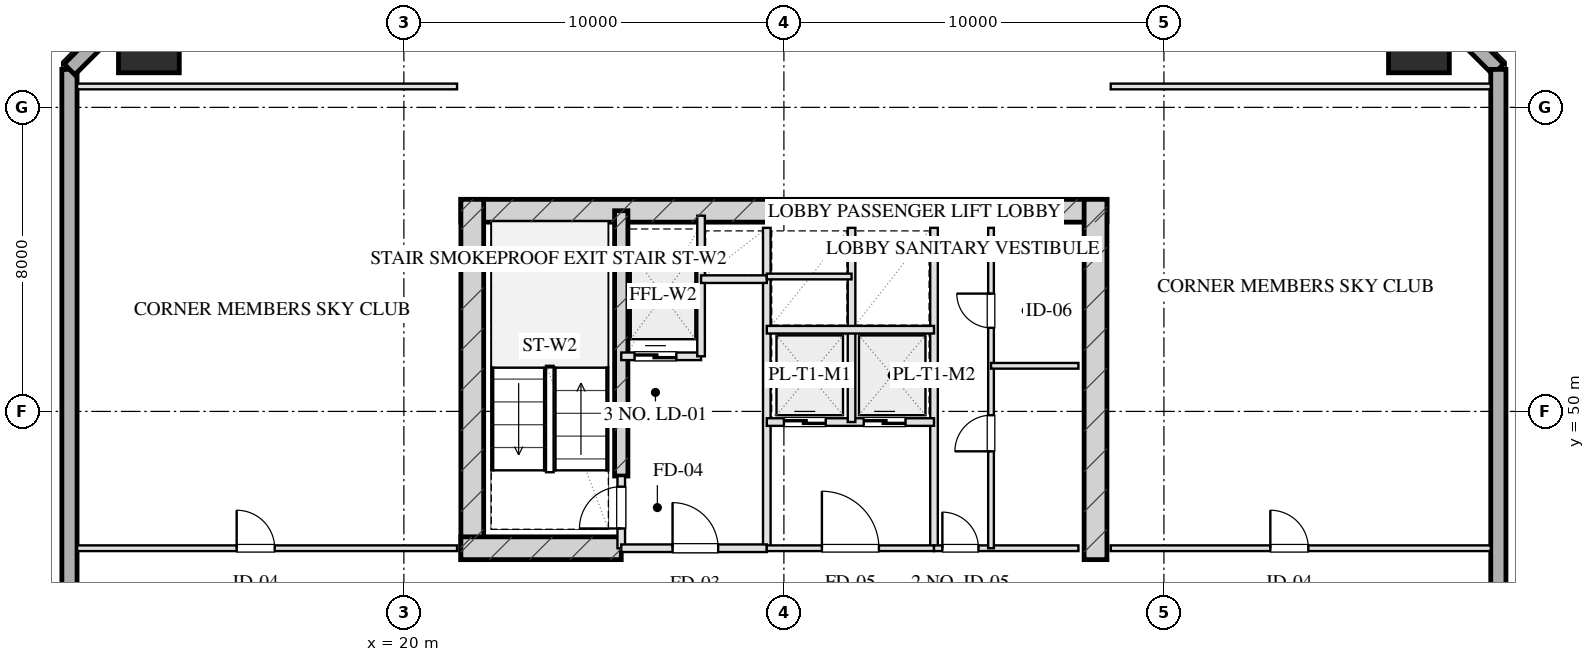
"""IFC4 building model, lengths in metres.
Left out: names, types, materials, properties, quantities, classifications, styles, units other than length and angle.
Written with IfcOpenShell. Run it as: python <this file> out.ifc"""

import sys

from ifc_helpers import new_model, si_unit, direction, frame, frame_2d, origin, origin_2d, place, context, subcontext, project, spatial, rectangle, hollow_rectangle, extrude, element, fill, save


model = new_model("IFC4")
c1 = context("Model", 3, precision=1e-05, world=origin(), true_north=direction((0.0, 1.0)))
c2 = subcontext(c1, "Body", "Model", "MODEL_VIEW")
j1 = project(units=[si_unit("LENGTHUNIT", "METRE"), si_unit("PLANEANGLEUNIT", "RADIAN")], contexts=[c1])
p1 = place(None, origin())
s1 = spatial("IfcSite", under=j1, at=p1, CompositionType="ELEMENT")
p2 = place(p1, origin())
s2 = spatial("IfcBuilding", under=s1, at=p2, CompositionType="ELEMENT")
p3 = place(p2, frame((0.0, 0.0, 156.4)))
s3 = spatial("IfcBuildingStorey", under=s2, at=p3, CompositionType="ELEMENT", Elevation=156.4)
p4 = place(p3, frame((21.5, 55.28, 0.0), z_axis=(0.0, 0.0, 1.0), x_axis=(1.0, 0.0, 0.0)))
e1 = element("IfcWall", 1, at=p4, inside=s3, PredefinedType="SHEAR", context=c2, shape_type="SweptSolid", body=[
    extrude(rectangle(XDim=17.0, YDim=0.6, at=frame_2d((8.5, 0.0))), origin(), (0.0, 0.0, 1.0), 3.45),
])
for number, where, z_axis, x_axis in (
    (2, (21.8, 46.1, 0.0), (0.0, 0.0, 1.0), (0.0, 1.0, 0.0)),
    (3, (38.2, 46.1, 0.0), (0.0, 0.0, 1.0), (0.0, 1.0, 0.0)),
):
    element("IfcWall", number, at=place(p3, frame(where, z_axis=z_axis, x_axis=x_axis)), inside=s3, PredefinedType="SHEAR", context=c2, shape_type="SweptSolid", body=[
        extrude(rectangle(XDim=9.48, YDim=0.6, at=frame_2d((4.74, 0.0))), origin(), (0.0, 0.0, 1.0), 3.45),
    ])
p5 = place(p3, frame((25.72, 48.3, 0.0), z_axis=(0.0, 0.0, 1.0), x_axis=(0.0, 1.0, 0.0)))
e4 = element("IfcWall", 4, at=p5, inside=s3, PredefinedType="SHEAR", context=c2, shape_type="SweptSolid", body=[
    extrude(rectangle(XDim=6.98, YDim=0.35, at=frame_2d((3.49, 0.0))), origin(), (0.0, 0.0, 1.0), 3.45),
])
p6 = place(p3, frame((21.5, 46.4, 0.0), z_axis=(0.0, 0.0, 1.0), x_axis=(1.0, 0.0, 0.0)))
e5 = element("IfcWall", 5, at=p6, inside=s3, PredefinedType="SHEAR", context=c2, shape_type="SweptSolid", body=[
    extrude(rectangle(XDim=4.22, YDim=0.6, at=frame_2d((2.11, 0.0))), origin(), (0.0, 0.0, 1.0), 3.45),
])
for number, where, z_axis, x_axis in (
    (6, (46.71, 59.71, 0.0), (0.0, 0.0, 1.0), (1.0, 0.0, 0.0)),
    (7, (13.29, 59.71, 0.0), (0.0, 0.0, 1.0), (1.0, 0.0, 0.0)),
):
    element("IfcColumn", number, at=place(p3, frame(where, z_axis=z_axis, x_axis=x_axis)), inside=s3, PredefinedType="COLUMN", context=c2, shape_type="SweptSolid", body=[
        extrude(hollow_rectangle(XDim=1.6, YDim=1.6, WallThickness=0.055, at=origin_2d()), origin(), (0.0, 0.0, 1.0), 3.451),
    ])
p7 = place(p3, frame((11.2, 9.0, 0.0), z_axis=(0.0, 0.0, 1.0), x_axis=(0.0, 1.0, 0.0)))
e8 = element("IfcWall", 8, at=p7, inside=s3, PredefinedType="SOLIDWALL", context=c2, shape_type="SweptSolid", body=[
    extrude(rectangle(XDim=50.0, YDim=0.4, at=frame_2d((25.0, 0.0))), origin(), (0.0, 0.0, 1.0), 2.61),
])
p8 = place(p7, frame((17.475, 0.0, 0.75)))
e9 = element("IfcOpeningElement", 9, at=p8, cuts=e8, PredefinedType="OPENING", context=c2, shape_type="SweptSolid", body=[
    extrude(rectangle(XDim=2.25, YDim=1.46, at=frame_2d((1.125, 0.73))), frame((0.0, 0.21, 0.0), z_axis=(0.0, -1.0, 0.0), x_axis=(1.0, 0.0, 0.0)), (0.0, 0.0, 1.0), 0.42),
])
p9 = place(p7, frame((30.25, 0.0, 0.0)))
e10 = element("IfcOpeningElement", 10, at=p9, cuts=e8, PredefinedType="OPENING", context=c2, shape_type="SweptSolid", body=[
    extrude(rectangle(XDim=1.1, YDim=2.15, at=frame_2d((0.55, 1.075))), frame((0.0, 0.21, 0.0), z_axis=(0.0, -1.0, 0.0), x_axis=(1.0, 0.0, 0.0)), (0.0, 0.0, 1.0), 0.42),
])
for number, where, z_axis, x_axis in (
    (11, (11.2, 59.0, 0.0), (0.0, 0.0, 1.0), (0.707, 0.707, 0.0)),
    (12, (46.0, 61.8, 0.0), (0.0, 0.0, 1.0), (0.707, -0.707, 0.0)),
):
    element("IfcWall", number, at=place(p3, frame(where, z_axis=z_axis, x_axis=x_axis)), inside=s3, PredefinedType="SOLIDWALL", context=c2, shape_type="SweptSolid", body=[
        extrude(rectangle(XDim=3.96, YDim=0.4, at=frame_2d((1.98, 0.0))), origin(), (0.0, 0.0, 1.0), 2.61),
    ])
p10 = place(p3, frame((48.8, 59.0, 0.0), z_axis=(0.0, 0.0, 1.0), x_axis=(0.0, -1.0, 0.0)))
e13 = element("IfcWall", 13, at=p10, inside=s3, PredefinedType="SOLIDWALL", context=c2, shape_type="SweptSolid", body=[
    extrude(rectangle(XDim=50.0, YDim=0.4, at=frame_2d((25.0, 0.0))), origin(), (0.0, 0.0, 1.0), 2.61),
])
p11 = place(p10, frame((21.35, 0.0, 0.0)))
e14 = element("IfcOpeningElement", 14, at=p11, cuts=e13, PredefinedType="OPENING", context=c2, shape_type="SweptSolid", body=[
    extrude(rectangle(XDim=1.1, YDim=2.15, at=frame_2d((0.55, 1.075))), frame((0.0, 0.21, 0.0), z_axis=(0.0, -1.0, 0.0), x_axis=(1.0, 0.0, 0.0)), (0.0, 0.0, 1.0), 0.42),
])
p12 = place(p3, frame((25.72, 46.4, 0.0), z_axis=(0.0, 0.0, 1.0), x_axis=(0.0, 1.0, 0.0)))
e15 = element("IfcWall", 15, at=p12, inside=s3, PredefinedType="PARTITIONING", context=c2, shape_type="SweptSolid", body=[
    extrude(rectangle(XDim=1.9, YDim=0.2, at=frame_2d((0.95, 0.0))), origin(), (0.0, 0.0, 1.0), 3.175),
])
p13 = place(p12, frame((0.52, 0.0, 0.0)))
e16 = element("IfcOpeningElement", 16, at=p13, cuts=e15, PredefinedType="OPENING", context=c2, shape_type="SweptSolid", body=[
    extrude(rectangle(XDim=1.1, YDim=2.05, at=frame_2d((0.55, 1.025))), frame((0.0, 0.11, 0.0), z_axis=(0.0, -1.0, 0.0), x_axis=(1.0, 0.0, 0.0)), (0.0, 0.0, 1.0), 0.22),
])
p14 = place(p3, frame((29.55, 46.4, 0.0), z_axis=(0.0, 0.0, 1.0), x_axis=(0.0, 1.0, 0.0)))
e17 = element("IfcWall", 17, at=p14, inside=s3, PredefinedType="PARTITIONING", context=c2, shape_type="SweptSolid", body=[
    extrude(rectangle(XDim=8.43, YDim=0.2, at=frame_2d((4.215, 0.0))), origin(), (0.0, 0.0, 1.0), 3.175),
])
p15 = place(p3, frame((25.72, 46.4, 0.0), z_axis=(0.0, 0.0, 1.0), x_axis=(1.0, 0.0, 0.0)))
e18 = element("IfcWall", 18, at=p15, inside=s3, PredefinedType="PARTITIONING", context=c2, shape_type="SweptSolid", body=[
    extrude(rectangle(XDim=3.83, YDim=0.2, at=frame_2d((1.915, 0.0))), origin(), (0.0, 0.0, 1.0), 3.175),
])
p16 = place(p15, frame((1.35, 0.0, 0.0)))
e19 = element("IfcOpeningElement", 19, at=p16, cuts=e18, PredefinedType="OPENING", context=c2, shape_type="SweptSolid", body=[
    extrude(rectangle(XDim=1.2, YDim=2.05, at=frame_2d((0.6, 1.025))), frame((0.0, 0.11, 0.0), z_axis=(0.0, -1.0, 0.0), x_axis=(1.0, 0.0, 0.0)), (0.0, 0.0, 1.0), 0.22),
])
p17 = place(p3, frame((25.72, 51.45, 0.0), z_axis=(0.0, 0.0, 1.0), x_axis=(1.0, 0.0, 0.0)))
e20 = element("IfcWall", 20, at=p17, inside=s3, PredefinedType="PARTITIONING", context=c2, shape_type="SweptSolid", body=[
    extrude(rectangle(XDim=2.1, YDim=0.2, at=frame_2d((1.05, 0.0))), origin(), (0.0, 0.0, 1.0), 3.175),
])
p18 = place(p17, frame((0.35, 0.0, 0.0)))
e21 = element("IfcOpeningElement", 21, at=p18, cuts=e20, PredefinedType="OPENING", context=c2, shape_type="SweptSolid", body=[
    extrude(rectangle(XDim=1.1, YDim=2.05, at=frame_2d((0.55, 1.025))), frame((0.0, 0.11, 0.0), z_axis=(0.0, -1.0, 0.0), x_axis=(1.0, 0.0, 0.0)), (0.0, 0.0, 1.0), 0.22),
])
p19 = place(p3, frame((27.82, 51.45, 0.0), z_axis=(0.0, 0.0, 1.0), x_axis=(0.0, 1.0, 0.0)))
e22 = element("IfcWall", 22, at=p19, inside=s3, PredefinedType="PARTITIONING", context=c2, shape_type="SweptSolid", body=[
    extrude(rectangle(XDim=3.7, YDim=0.2, at=frame_2d((1.85, 0.0))), origin(), (0.0, 0.0, 1.0), 3.175),
])
p20 = place(p3, frame((27.82, 53.48, 0.0), z_axis=(0.0, 0.0, 1.0), x_axis=(1.0, 0.0, 0.0)))
e23 = element("IfcWall", 23, at=p20, inside=s3, PredefinedType="PARTITIONING", context=c2, shape_type="SweptSolid", body=[
    extrude(rectangle(XDim=1.73, YDim=0.2, at=frame_2d((0.865, 0.0))), origin(), (0.0, 0.0, 1.0), 3.175),
])
p21 = place(p3, frame((33.95, 46.4, 0.0), z_axis=(0.0, 0.0, 1.0), x_axis=(0.0, 1.0, 0.0)))
e24 = element("IfcWall", 24, at=p21, inside=s3, PredefinedType="PARTITIONING", context=c2, shape_type="SweptSolid", body=[
    extrude(rectangle(XDim=8.43, YDim=0.2, at=frame_2d((4.215, 0.0))), origin(), (0.0, 0.0, 1.0), 3.175),
])
p22 = place(p3, frame((29.55, 46.4, 0.0), z_axis=(0.0, 0.0, 1.0), x_axis=(1.0, 0.0, 0.0)))
e25 = element("IfcWall", 25, at=p22, inside=s3, PredefinedType="PARTITIONING", context=c2, shape_type="SweptSolid", body=[
    extrude(rectangle(XDim=4.4, YDim=0.15, at=frame_2d((2.2, 0.0))), origin(), (0.0, 0.0, 1.0), 3.175),
])
p23 = place(p22, frame((1.45, 0.0, 0.0)))
e26 = element("IfcOpeningElement", 26, at=p23, cuts=e25, PredefinedType="OPENING", context=c2, shape_type="SweptSolid", body=[
    extrude(rectangle(XDim=1.5, YDim=2.05, at=frame_2d((0.75, 1.025))), frame((0.0, 0.085, 0.0), z_axis=(0.0, -1.0, 0.0), x_axis=(1.0, 0.0, 0.0)), (0.0, 0.0, 1.0), 0.17),
])
p24 = place(p3, frame((29.55, 49.72, 0.0), z_axis=(0.0, 0.0, 1.0), x_axis=(1.0, 0.0, 0.0)))
e27 = element("IfcWall", 27, at=p24, inside=s3, PredefinedType="PARTITIONING", context=c2, shape_type="SweptSolid", body=[
    extrude(rectangle(XDim=4.4, YDim=0.2, at=frame_2d((2.2, 0.0))), origin(), (0.0, 0.0, 1.0), 3.175),
])
p25 = place(p24, frame((0.45, 0.0, 0.0)))
e28 = element("IfcOpeningElement", 28, at=p25, cuts=e27, PredefinedType="OPENING", context=c2, shape_type="SweptSolid", body=[
    extrude(rectangle(XDim=1.1, YDim=2.05, at=frame_2d((0.55, 1.025))), frame((0.0, 0.11, 0.0), z_axis=(0.0, -1.0, 0.0), x_axis=(1.0, 0.0, 0.0)), (0.0, 0.0, 1.0), 0.22),
])
p26 = place(p24, frame((2.55, 0.0, 0.0)))
e29 = element("IfcOpeningElement", 29, at=p26, cuts=e27, PredefinedType="OPENING", context=c2, shape_type="SweptSolid", body=[
    extrude(rectangle(XDim=1.1, YDim=2.05, at=frame_2d((0.55, 1.025))), frame((0.0, 0.11, 0.0), z_axis=(0.0, -1.0, 0.0), x_axis=(1.0, 0.0, 0.0)), (0.0, 0.0, 1.0), 0.22),
])
p27 = place(p3, frame((31.78, 49.72, 0.0), z_axis=(0.0, 0.0, 1.0), x_axis=(0.0, 1.0, 0.0)))
e30 = element("IfcWall", 30, at=p27, inside=s3, PredefinedType="PARTITIONING", context=c2, shape_type="SweptSolid", body=[
    extrude(rectangle(XDim=5.11, YDim=0.2, at=frame_2d((2.555, 0.0))), origin(), (0.0, 0.0, 1.0), 3.175),
])
p28 = place(p3, frame((29.55, 52.15, 0.0), z_axis=(0.0, 0.0, 1.0), x_axis=(1.0, 0.0, 0.0)))
e31 = element("IfcWall", 31, at=p28, inside=s3, PredefinedType="PARTITIONING", context=c2, shape_type="SweptSolid", body=[
    extrude(rectangle(XDim=4.4, YDim=0.2, at=frame_2d((2.2, 0.0))), origin(), (0.0, 0.0, 1.0), 3.175),
])
p29 = place(p3, frame((29.55, 53.55, 0.0), z_axis=(0.0, 0.0, 1.0), x_axis=(1.0, 0.0, 0.0)))
e32 = element("IfcWall", 32, at=p29, inside=s3, PredefinedType="PARTITIONING", context=c2, shape_type="SweptSolid", body=[
    extrude(rectangle(XDim=2.23, YDim=0.15, at=frame_2d((1.115, 0.0))), origin(), (0.0, 0.0, 1.0), 3.175),
])
p30 = place(p3, frame((33.95, 46.4, 0.0), z_axis=(0.0, 0.0, 1.0), x_axis=(1.0, 0.0, 0.0)))
e33 = element("IfcWall", 33, at=p30, inside=s3, PredefinedType="PARTITIONING", context=c2, shape_type="SweptSolid", body=[
    extrude(rectangle(XDim=3.8, YDim=0.15, at=frame_2d((1.9, 0.0))), origin(), (0.0, 0.0, 1.0), 3.175),
])
p31 = place(p30, frame((0.22, 0.0, 0.0)))
e34 = element("IfcOpeningElement", 34, at=p31, cuts=e33, PredefinedType="OPENING", context=c2, shape_type="SweptSolid", body=[
    extrude(rectangle(XDim=0.95, YDim=2.05, at=frame_2d((0.475, 1.025))), frame((0.0, 0.085, 0.0), z_axis=(0.0, -1.0, 0.0), x_axis=(1.0, 0.0, 0.0)), (0.0, 0.0, 1.0), 0.17),
])
p32 = place(p3, frame((35.45, 46.4, 0.0), z_axis=(0.0, 0.0, 1.0), x_axis=(0.0, 1.0, 0.0)))
e35 = element("IfcWall", 35, at=p32, inside=s3, PredefinedType="PARTITIONING", context=c2, shape_type="SweptSolid", body=[
    extrude(rectangle(XDim=8.43, YDim=0.15, at=frame_2d((4.215, 0.0))), origin(), (0.0, 0.0, 1.0), 2.815),
])
p33 = place(p32, frame((2.55, 0.0, 0.0)))
e36 = element("IfcOpeningElement", 36, at=p33, cuts=e35, PredefinedType="OPENING", context=c2, shape_type="SweptSolid", body=[
    extrude(rectangle(XDim=0.95, YDim=2.05, at=frame_2d((0.475, 1.025))), frame((0.0, 0.085, 0.0), z_axis=(0.0, -1.0, 0.0), x_axis=(1.0, 0.0, 0.0)), (0.0, 0.0, 1.0), 0.17),
])
p34 = place(p32, frame((5.8, 0.0, 0.0)))
e37 = element("IfcOpeningElement", 37, at=p34, cuts=e35, PredefinedType="OPENING", context=c2, shape_type="SweptSolid", body=[
    extrude(rectangle(XDim=0.9, YDim=2.05, at=frame_2d((0.45, 1.025))), frame((0.0, 0.085, 0.0), z_axis=(0.0, -1.0, 0.0), x_axis=(1.0, 0.0, 0.0)), (0.0, 0.0, 1.0), 0.17),
])
p35 = place(p3, frame((35.45, 51.2, 0.0), z_axis=(0.0, 0.0, 1.0), x_axis=(1.0, 0.0, 0.0)))
e38 = element("IfcWall", 38, at=p35, inside=s3, PredefinedType="PARTITIONING", context=c2, shape_type="SweptSolid", body=[
    extrude(rectangle(XDim=2.3, YDim=0.15, at=frame_2d((1.15, 0.0))), origin(), (0.0, 0.0, 1.0), 3.175),
])
p36 = place(p3, frame((11.4, 58.55, 0.0), z_axis=(0.0, 0.0, 1.0), x_axis=(1.0, 0.0, 0.0)))
e39 = element("IfcWall", 39, at=p36, inside=s3, PredefinedType="PARTITIONING", context=c2, shape_type="SweptSolid", body=[
    extrude(rectangle(XDim=10.0, YDim=0.15, at=frame_2d((5.0, 0.0))), origin(), (0.0, 0.0, 1.0), 3.175),
])
p37 = place(p3, frame((11.4, 46.4, 0.0), z_axis=(0.0, 0.0, 1.0), x_axis=(1.0, 0.0, 0.0)))
e40 = element("IfcWall", 40, at=p37, inside=s3, PredefinedType="PARTITIONING", context=c2, shape_type="SweptSolid", body=[
    extrude(rectangle(XDim=10.0, YDim=0.15, at=frame_2d((5.0, 0.0))), origin(), (0.0, 0.0, 1.0), 2.15),
])
p38 = place(p37, frame((4.2, 0.0, 0.0)))
e41 = element("IfcOpeningElement", 41, at=p38, cuts=e40, PredefinedType="OPENING", context=c2, shape_type="SweptSolid", body=[
    extrude(rectangle(XDim=1.0, YDim=2.05, at=frame_2d((0.5, 1.025))), frame((0.0, 0.085, 0.0), z_axis=(0.0, -1.0, 0.0), x_axis=(1.0, 0.0, 0.0)), (0.0, 0.0, 1.0), 0.17),
])
p39 = place(p3, frame((38.6, 58.55, 0.0), z_axis=(0.0, 0.0, 1.0), x_axis=(1.0, 0.0, 0.0)))
e42 = element("IfcWall", 42, at=p39, inside=s3, PredefinedType="PARTITIONING", context=c2, shape_type="SweptSolid", body=[
    extrude(rectangle(XDim=10.0, YDim=0.15, at=frame_2d((5.0, 0.0))), origin(), (0.0, 0.0, 1.0), 3.175),
])
p40 = place(p3, frame((38.6, 46.4, 0.0), z_axis=(0.0, 0.0, 1.0), x_axis=(1.0, 0.0, 0.0)))
e43 = element("IfcWall", 43, at=p40, inside=s3, PredefinedType="PARTITIONING", context=c2, shape_type="SweptSolid", body=[
    extrude(rectangle(XDim=10.0, YDim=0.15, at=frame_2d((5.0, 0.0))), origin(), (0.0, 0.0, 1.0), 2.15),
])
p41 = place(p40, frame((4.2, 0.0, 0.0)))
e44 = element("IfcOpeningElement", 44, at=p41, cuts=e43, PredefinedType="OPENING", context=c2, shape_type="SweptSolid", body=[
    extrude(rectangle(XDim=1.0, YDim=2.05, at=frame_2d((0.5, 1.025))), frame((0.0, 0.085, 0.0), z_axis=(0.0, -1.0, 0.0), x_axis=(1.0, 0.0, 0.0)), (0.0, 0.0, 1.0), 0.17),
])
p42 = place(p13, origin())
e45 = element("IfcDoor", 45, at=p42, inside=s3, OperationType="SINGLE_SWING_LEFT", PredefinedType="DOOR", context=c2, shape_type="SweptSolid", body=[
    extrude(rectangle(XDim=1.1, YDim=2.05, at=frame_2d((0.55, 1.025))), frame((0.0, 0.025, 0.0), z_axis=(0.0, -1.0, 0.0), x_axis=(1.0, 0.0, 0.0)), (0.0, 0.0, 1.0), 0.05),
])
fill(e16, e45)
p43 = place(p16, origin())
e46 = element("IfcDoor", 46, at=p43, inside=s3, OperationType="SINGLE_SWING_LEFT", PredefinedType="DOOR", context=c2, shape_type="SweptSolid", body=[
    extrude(rectangle(XDim=1.2, YDim=2.05, at=frame_2d((0.6, 1.025))), frame((0.0, 0.025, 0.0), z_axis=(0.0, -1.0, 0.0), x_axis=(1.0, 0.0, 0.0)), (0.0, 0.0, 1.0), 0.05),
])
fill(e19, e46)
p44 = place(p18, origin())
e47 = element("IfcDoor", 47, at=p44, inside=s3, OperationType="DOUBLE_DOOR_SLIDING", PredefinedType="DOOR", context=c2, shape_type="SweptSolid", body=[
    extrude(rectangle(XDim=1.1, YDim=2.05, at=frame_2d((0.55, 1.025))), frame((0.0, 0.025, 0.0), z_axis=(0.0, -1.0, 0.0), x_axis=(1.0, 0.0, 0.0)), (0.0, 0.0, 1.0), 0.05),
])
fill(e21, e47)
p45 = place(p23, origin())
e48 = element("IfcDoor", 48, at=p45, inside=s3, OperationType="SINGLE_SWING_LEFT", PredefinedType="DOOR", context=c2, shape_type="SweptSolid", body=[
    extrude(rectangle(XDim=1.5, YDim=2.05, at=frame_2d((0.75, 1.025))), frame((0.0, 0.025, 0.0), z_axis=(0.0, -1.0, 0.0), x_axis=(1.0, 0.0, 0.0)), (0.0, 0.0, 1.0), 0.05),
])
fill(e26, e48)
p46 = place(p25, origin())
e49 = element("IfcDoor", 49, at=p46, inside=s3, OperationType="DOUBLE_DOOR_SLIDING", PredefinedType="DOOR", context=c2, shape_type="SweptSolid", body=[
    extrude(rectangle(XDim=1.1, YDim=2.05, at=frame_2d((0.55, 1.025))), frame((0.0, 0.025, 0.0), z_axis=(0.0, -1.0, 0.0), x_axis=(1.0, 0.0, 0.0)), (0.0, 0.0, 1.0), 0.05),
])
fill(e28, e49)
p47 = place(p26, origin())
e50 = element("IfcDoor", 50, at=p47, inside=s3, OperationType="DOUBLE_DOOR_SLIDING", PredefinedType="DOOR", context=c2, shape_type="SweptSolid", body=[
    extrude(rectangle(XDim=1.1, YDim=2.05, at=frame_2d((0.55, 1.025))), frame((0.0, 0.025, 0.0), z_axis=(0.0, -1.0, 0.0), x_axis=(1.0, 0.0, 0.0)), (0.0, 0.0, 1.0), 0.05),
])
fill(e29, e50)
p48 = place(p31, origin())
e51 = element("IfcDoor", 51, at=p48, inside=s3, OperationType="SINGLE_SWING_LEFT", PredefinedType="DOOR", context=c2, shape_type="SweptSolid", body=[
    extrude(rectangle(XDim=0.95, YDim=2.05, at=frame_2d((0.475, 1.025))), frame((0.0, 0.025, 0.0), z_axis=(0.0, -1.0, 0.0), x_axis=(1.0, 0.0, 0.0)), (0.0, 0.0, 1.0), 0.05),
])
fill(e34, e51)
p49 = place(p33, origin())
e52 = element("IfcDoor", 52, at=p49, inside=s3, OperationType="SINGLE_SWING_LEFT", PredefinedType="DOOR", context=c2, shape_type="SweptSolid", body=[
    extrude(rectangle(XDim=0.95, YDim=2.05, at=frame_2d((0.475, 1.025))), frame((0.0, 0.025, 0.0), z_axis=(0.0, -1.0, 0.0), x_axis=(1.0, 0.0, 0.0)), (0.0, 0.0, 1.0), 0.05),
])
fill(e36, e52)
p50 = place(p34, origin())
e53 = element("IfcDoor", 53, at=p50, inside=s3, OperationType="SINGLE_SWING_RIGHT", PredefinedType="DOOR", context=c2, shape_type="SweptSolid", body=[
    extrude(rectangle(XDim=0.9, YDim=2.05, at=frame_2d((0.45, 1.025))), frame((0.0, 0.025, 0.0), z_axis=(0.0, -1.0, 0.0), x_axis=(1.0, 0.0, 0.0)), (0.0, 0.0, 1.0), 0.05),
])
fill(e37, e53)
p51 = place(p38, origin())
e54 = element("IfcDoor", 54, at=p51, inside=s3, OperationType="SINGLE_SWING_LEFT", PredefinedType="DOOR", context=c2, shape_type="SweptSolid", body=[
    extrude(rectangle(XDim=1.0, YDim=2.05, at=frame_2d((0.5, 1.025))), frame((0.0, 0.025, 0.0), z_axis=(0.0, -1.0, 0.0), x_axis=(1.0, 0.0, 0.0)), (0.0, 0.0, 1.0), 0.05),
])
fill(e41, e54)
p52 = place(p41, origin())
e55 = element("IfcDoor", 55, at=p52, inside=s3, OperationType="SINGLE_SWING_LEFT", PredefinedType="DOOR", context=c2, shape_type="SweptSolid", body=[
    extrude(rectangle(XDim=1.0, YDim=2.05, at=frame_2d((0.5, 1.025))), frame((0.0, 0.025, 0.0), z_axis=(0.0, -1.0, 0.0), x_axis=(1.0, 0.0, 0.0)), (0.0, 0.0, 1.0), 0.05),
])
fill(e44, e55)
save(model, sys.argv[1])
